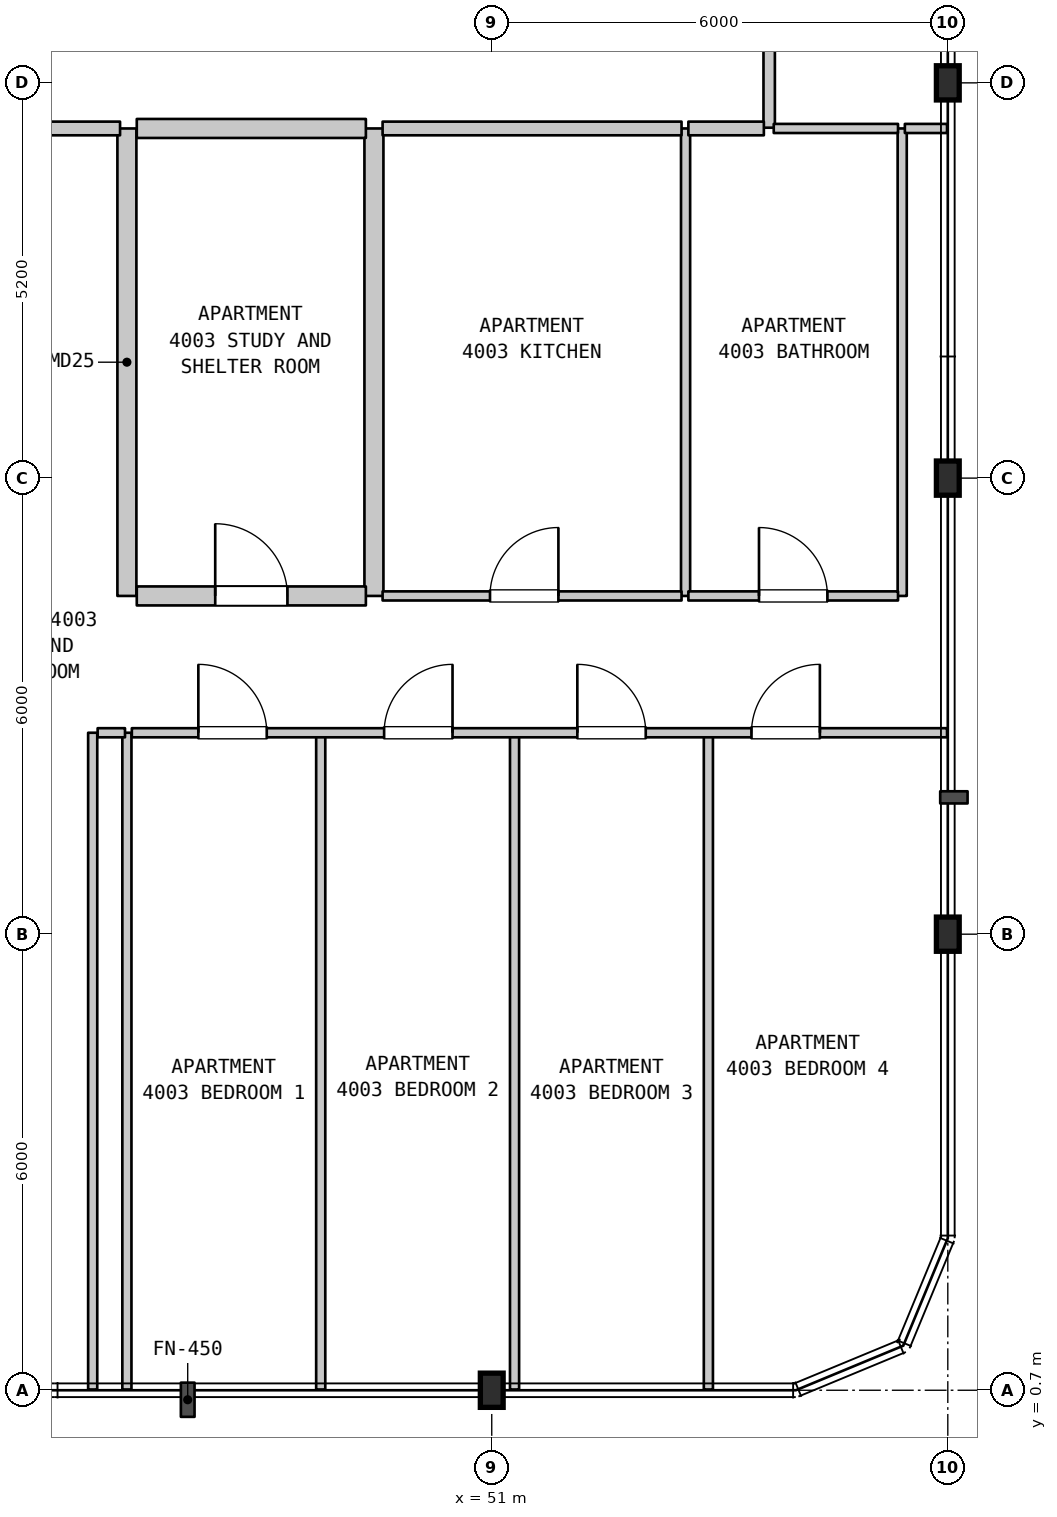
"""IFC4 building model, lengths in metres.
Left out: names, types, materials, properties, quantities, classifications, styles, units other than length and angle.
Written with IfcOpenShell. Run it as: python <this file> out.ifc"""

import sys

from ifc_helpers import new_model, si_unit, direction, frame, frame_2d, origin, origin_2d, place, context, subcontext, project, spatial, rectangle, i_section, extrude, element, fill, save


model = new_model("IFC4")
c1 = context("Model", 3, precision=1e-05, world=origin(), true_north=direction((0.0, 1.0)))
c2 = subcontext(c1, "Body", "Model", "MODEL_VIEW")
j1 = project(units=[si_unit("LENGTHUNIT", "METRE"), si_unit("PLANEANGLEUNIT", "RADIAN")], contexts=[c1])
p1 = place(None, origin())
s1 = spatial("IfcSite", under=j1, at=p1, CompositionType="ELEMENT")
p2 = place(p1, origin())
s2 = spatial("IfcBuilding", under=s1, at=p2, CompositionType="ELEMENT")
p3 = place(p2, frame((0.0, 0.0, 164.6)))
s3 = spatial("IfcBuildingStorey", under=s2, at=p3, CompositionType="ELEMENT", Elevation=164.6)
for number, where, z_axis, x_axis in (
    (1, (51.0, 0.7, 0.0), (0.0, 0.0, 1.0), (1.0, 0.0, 0.0)),
    (2, (57.0, 6.7, 0.0), (0.0, 0.0, 1.0), (1.0, 0.0, 0.0)),
    (3, (57.0, 12.7, 0.0), (0.0, 0.0, 1.0), (1.0, 0.0, 0.0)),
    (4, (57.0, 17.9, 0.0), (0.0, 0.0, 1.0), (1.0, 0.0, 0.0)),
):
    element("IfcColumn", number, at=place(p3, frame(where, z_axis=z_axis, x_axis=x_axis)), inside=s3, PredefinedType="COLUMN", context=c2, shape_type="SweptSolid", body=[
        extrude(i_section(OverallWidth=0.3, OverallDepth=0.45, WebThickness=0.014, FlangeThickness=0.026, FilletRadius=0.027, at=origin_2d()), origin(), (0.0, 0.0, 1.0), 4.5),
    ])
for number, where, z_axis, x_axis in (
    (5, (45.75, 0.71, 0.0), (0.0, 0.0, 1.0), (0.0, 1.0, 0.0)),
    (6, (46.2, 0.71, 0.0), (0.0, 0.0, 1.0), (0.0, 1.0, 0.0)),
):
    element("IfcWall", number, at=place(p3, frame(where, z_axis=z_axis, x_axis=x_axis)), inside=s3, PredefinedType="PARTITIONING", context=c2, shape_type="SweptSolid", body=[
        extrude(rectangle(XDim=8.64, YDim=0.12, at=frame_2d((4.32, 0.0))), origin(), (0.0, 0.0, 1.0), 4.19),
    ])
p4 = place(p3, frame((46.2, 11.15, 0.0), z_axis=(0.0, 0.0, 1.0), x_axis=(0.0, 1.0, 0.0)))
e7 = element("IfcWall", 7, at=p4, inside=s3, PredefinedType="STANDARD", context=c2, shape_type="SweptSolid", body=[
    extrude(rectangle(XDim=6.15, YDim=0.25, at=frame_2d((3.075, 0.0))), origin(), (0.0, 0.0, 1.0), 4.19),
])
p5 = place(p3, frame((48.75, 0.71, 0.0), z_axis=(0.0, 0.0, 1.0), x_axis=(0.0, 1.0, 0.0)))
e8 = element("IfcWall", 8, at=p5, inside=s3, PredefinedType="PARTITIONING", context=c2, shape_type="SweptSolid", body=[
    extrude(rectangle(XDim=8.64, YDim=0.12, at=frame_2d((4.32, 0.0))), origin(), (0.0, 0.0, 1.0), 4.19),
])
p6 = place(p3, frame((49.45, 11.15, 0.0), z_axis=(0.0, 0.0, 1.0), x_axis=(0.0, 1.0, 0.0)))
e9 = element("IfcWall", 9, at=p6, inside=s3, PredefinedType="STANDARD", context=c2, shape_type="SweptSolid", body=[
    extrude(rectangle(XDim=6.15, YDim=0.25, at=frame_2d((3.075, 0.0))), origin(), (0.0, 0.0, 1.0), 4.19),
])
p7 = place(p3, frame((51.3, 0.71, 0.0), z_axis=(0.0, 0.0, 1.0), x_axis=(0.0, 1.0, 0.0)))
e10 = element("IfcWall", 10, at=p7, inside=s3, PredefinedType="PARTITIONING", context=c2, shape_type="SweptSolid", body=[
    extrude(rectangle(XDim=8.64, YDim=0.12, at=frame_2d((4.32, 0.0))), origin(), (0.0, 0.0, 1.0), 4.19),
])
p8 = place(p3, frame((53.55, 11.15, 0.0), z_axis=(0.0, 0.0, 1.0), x_axis=(0.0, 1.0, 0.0)))
e11 = element("IfcWall", 11, at=p8, inside=s3, PredefinedType="PARTITIONING", context=c2, shape_type="SweptSolid", body=[
    extrude(rectangle(XDim=6.15, YDim=0.12, at=frame_2d((3.075, 0.0))), origin(), (0.0, 0.0, 1.0), 4.19),
])
p9 = place(p3, frame((53.85, 0.71, 0.0), z_axis=(0.0, 0.0, 1.0), x_axis=(0.0, 1.0, 0.0)))
e12 = element("IfcWall", 12, at=p9, inside=s3, PredefinedType="PARTITIONING", context=c2, shape_type="SweptSolid", body=[
    extrude(rectangle(XDim=8.64, YDim=0.12, at=frame_2d((4.32, 0.0))), origin(), (0.0, 0.0, 1.0), 4.19),
])
p10 = place(p3, frame((54.65, 17.31, 0.0), z_axis=(0.0, 0.0, 1.0), x_axis=(0.0, 1.0, 0.0)))
e13 = element("IfcWall", 13, at=p10, inside=s3, PredefinedType="STANDARD", context=c2, shape_type="SweptSolid", body=[
    extrude(rectangle(XDim=2.19, YDim=0.15, at=frame_2d((1.095, 0.0))), origin(), (0.0, 0.0, 1.0), 4.19),
])
p11 = place(p3, frame((56.4, 11.15, 0.0), z_axis=(0.0, 0.0, 1.0), x_axis=(0.0, 1.0, 0.0)))
e14 = element("IfcWall", 14, at=p11, inside=s3, PredefinedType="PARTITIONING", context=c2, shape_type="SweptSolid", body=[
    extrude(rectangle(XDim=6.15, YDim=0.12, at=frame_2d((3.075, 0.0))), origin(), (0.0, 0.0, 1.0), 4.19),
])
p12 = place(p3, frame((45.815, 9.35, 0.0), z_axis=(0.0, 0.0, 1.0), x_axis=(1.0, 0.0, 0.0)))
e15 = element("IfcWall", 15, at=p12, inside=s3, PredefinedType="PARTITIONING", context=c2, shape_type="SweptSolid", body=[
    extrude(rectangle(XDim=0.36, YDim=0.12, at=frame_2d((0.18, 0.0))), origin(), (0.0, 0.0, 1.0), 4.19),
])
p13 = place(p3, frame((46.265, 9.35, 0.0), z_axis=(0.0, 0.0, 1.0), x_axis=(1.0, 0.0, 0.0)))
e16 = element("IfcWall", 16, at=p13, inside=s3, PredefinedType="PARTITIONING", context=c2, shape_type="SweptSolid", body=[
    extrude(rectangle(XDim=10.725, YDim=0.12, at=frame_2d((5.363, 0.0))), origin(), (0.0, 0.0, 1.0), 4.19),
])
p14 = place(p13, frame((0.875, 0.0, 0.0)))
e17 = element("IfcOpeningElement", 17, at=p14, cuts=e16, PredefinedType="OPENING", context=c2, shape_type="SweptSolid", body=[
    extrude(rectangle(XDim=0.9, YDim=2.15, at=frame_2d((0.45, 1.075))), frame((0.0, 0.07, 0.0), z_axis=(0.0, -1.0, 0.0), x_axis=(1.0, 0.0, 0.0)), (0.0, 0.0, 1.0), 0.14),
])
p15 = place(p13, frame((3.319, 0.0, 0.0)))
e18 = element("IfcOpeningElement", 18, at=p15, cuts=e16, PredefinedType="OPENING", context=c2, shape_type="SweptSolid", body=[
    extrude(rectangle(XDim=0.9, YDim=2.15, at=frame_2d((0.45, 1.075))), frame((0.0, 0.07, 0.0), z_axis=(0.0, -1.0, 0.0), x_axis=(1.0, 0.0, 0.0)), (0.0, 0.0, 1.0), 0.14),
])
p16 = place(p13, frame((5.861, 0.0, 0.0)))
e19 = element("IfcOpeningElement", 19, at=p16, cuts=e16, PredefinedType="OPENING", context=c2, shape_type="SweptSolid", body=[
    extrude(rectangle(XDim=0.9, YDim=2.15, at=frame_2d((0.45, 1.075))), frame((0.0, 0.07, 0.0), z_axis=(0.0, -1.0, 0.0), x_axis=(1.0, 0.0, 0.0)), (0.0, 0.0, 1.0), 0.14),
])
p17 = place(p13, frame((8.152, 0.0, 0.0)))
e20 = element("IfcOpeningElement", 20, at=p17, cuts=e16, PredefinedType="OPENING", context=c2, shape_type="SweptSolid", body=[
    extrude(rectangle(XDim=0.9, YDim=2.15, at=frame_2d((0.45, 1.075))), frame((0.0, 0.07, 0.0), z_axis=(0.0, -1.0, 0.0), x_axis=(1.0, 0.0, 0.0)), (0.0, 0.0, 1.0), 0.14),
])
p18 = place(p3, frame((46.33, 11.15, 0.0), z_axis=(0.0, 0.0, 1.0), x_axis=(1.0, 0.0, 0.0)))
e21 = element("IfcWall", 21, at=p18, inside=s3, PredefinedType="STANDARD", context=c2, shape_type="SweptSolid", body=[
    extrude(rectangle(XDim=3.014, YDim=0.25, at=frame_2d((1.507, 0.0))), origin(), (0.0, 0.0, 1.0), 4.19),
])
p19 = place(p18, frame((1.032, 0.0, 0.0)))
e22 = element("IfcOpeningElement", 22, at=p19, cuts=e21, PredefinedType="OPENING", context=c2, shape_type="SweptSolid", body=[
    extrude(rectangle(XDim=0.95, YDim=2.15, at=frame_2d((0.475, 1.075))), frame((0.0, 0.135, 0.0), z_axis=(0.0, -1.0, 0.0), x_axis=(1.0, 0.0, 0.0)), (0.0, 0.0, 1.0), 0.27),
])
p20 = place(p3, frame((49.564, 11.15, 0.0), z_axis=(0.0, 0.0, 1.0), x_axis=(1.0, 0.0, 0.0)))
e23 = element("IfcWall", 23, at=p20, inside=s3, PredefinedType="PARTITIONING", context=c2, shape_type="SweptSolid", body=[
    extrude(rectangle(XDim=3.933, YDim=0.12, at=frame_2d((1.967, 0.0))), origin(), (0.0, 0.0, 1.0), 4.19),
])
p21 = place(p20, frame((1.413, 0.0, 0.0)))
e24 = element("IfcOpeningElement", 24, at=p21, cuts=e23, PredefinedType="OPENING", context=c2, shape_type="SweptSolid", body=[
    extrude(rectangle(XDim=0.9, YDim=2.15, at=frame_2d((0.45, 1.075))), frame((0.0, 0.07, 0.0), z_axis=(0.0, -1.0, 0.0), x_axis=(1.0, 0.0, 0.0)), (0.0, 0.0, 1.0), 0.14),
])
p22 = place(p3, frame((53.587, 11.15, 0.0), z_axis=(0.0, 0.0, 1.0), x_axis=(1.0, 0.0, 0.0)))
e25 = element("IfcWall", 25, at=p22, inside=s3, PredefinedType="PARTITIONING", context=c2, shape_type="SweptSolid", body=[
    extrude(rectangle(XDim=2.758, YDim=0.12, at=frame_2d((1.379, 0.0))), origin(), (0.0, 0.0, 1.0), 4.19),
])
p23 = place(p22, frame((0.929, 0.0, 0.0)))
e26 = element("IfcOpeningElement", 26, at=p23, cuts=e25, PredefinedType="OPENING", context=c2, shape_type="SweptSolid", body=[
    extrude(rectangle(XDim=0.9, YDim=2.1, at=frame_2d((0.45, 1.05))), frame((0.0, 0.07, 0.0), z_axis=(0.0, -1.0, 0.0), x_axis=(1.0, 0.0, 0.0)), (0.0, 0.0, 1.0), 0.14),
])
p24 = place(p3, frame((40.565, 17.3, 0.0), z_axis=(0.0, 0.0, 1.0), x_axis=(1.0, 0.0, 0.0)))
e27 = element("IfcWall", 27, at=p24, inside=s3, PredefinedType="STANDARD", context=c2, shape_type="SweptSolid", body=[
    extrude(rectangle(XDim=5.545, YDim=0.18, at=frame_2d((2.772, 0.0))), origin(), (0.0, 0.0, 1.0), 4.19),
])
p25 = place(p24, frame((2.305, 0.0, 0.0)))
e28 = element("IfcOpeningElement", 28, at=p25, cuts=e27, PredefinedType="OPENING", context=c2, shape_type="SweptSolid", body=[
    extrude(rectangle(XDim=1.0, YDim=2.15, at=frame_2d((0.5, 1.075))), frame((0.0, 0.1, 0.0), z_axis=(0.0, -1.0, 0.0), x_axis=(1.0, 0.0, 0.0)), (0.0, 0.0, 1.0), 0.2),
])
p26 = place(p3, frame((46.33, 17.3, 0.0), z_axis=(0.0, 0.0, 1.0), x_axis=(1.0, 0.0, 0.0)))
e29 = element("IfcWall", 29, at=p26, inside=s3, PredefinedType="STANDARD", context=c2, shape_type="SweptSolid", body=[
    extrude(rectangle(XDim=3.014, YDim=0.25, at=frame_2d((1.507, 0.0))), origin(), (0.0, 0.0, 1.0), 4.19),
])
p27 = place(p3, frame((49.564, 17.3, 0.0), z_axis=(0.0, 0.0, 1.0), x_axis=(1.0, 0.0, 0.0)))
e30 = element("IfcWall", 30, at=p27, inside=s3, PredefinedType="STANDARD", context=c2, shape_type="SweptSolid", body=[
    extrude(rectangle(XDim=3.933, YDim=0.18, at=frame_2d((1.967, 0.0))), origin(), (0.0, 0.0, 1.0), 4.19),
])
p28 = place(p3, frame((53.587, 17.3, 0.0), z_axis=(0.0, 0.0, 1.0), x_axis=(1.0, 0.0, 0.0)))
e31 = element("IfcWall", 31, at=p28, inside=s3, PredefinedType="STANDARD", context=c2, shape_type="SweptSolid", body=[
    extrude(rectangle(XDim=0.993, YDim=0.18, at=frame_2d((0.497, 0.0))), origin(), (0.0, 0.0, 1.0), 4.19),
])
p29 = place(p3, frame((54.71, 17.3, 0.0), z_axis=(0.0, 0.0, 1.0), x_axis=(1.0, 0.0, 0.0)))
e32 = element("IfcWall", 32, at=p29, inside=s3, PredefinedType="PARTITIONING", context=c2, shape_type="SweptSolid", body=[
    extrude(rectangle(XDim=1.635, YDim=0.12, at=frame_2d((0.817, 0.0))), origin(), (0.0, 0.0, 1.0), 4.19),
])
p30 = place(p3, frame((56.435, 17.3, 0.0), z_axis=(0.0, 0.0, 1.0), x_axis=(1.0, 0.0, 0.0)))
e33 = element("IfcWall", 33, at=p30, inside=s3, PredefinedType="PARTITIONING", context=c2, shape_type="SweptSolid", body=[
    extrude(rectangle(XDim=0.555, YDim=0.12, at=frame_2d((0.277, 0.0))), origin(), (0.0, 0.0, 1.0), 4.19),
])
p31 = place(p14, origin())
e34 = element("IfcDoor", 34, at=p31, inside=s3, OperationType="SINGLE_SWING_LEFT", PredefinedType="DOOR", context=c2, shape_type="SweptSolid", body=[
    extrude(rectangle(XDim=0.9, YDim=2.15, at=frame_2d((0.45, 1.075))), frame((0.0, 0.025, 0.0), z_axis=(0.0, -1.0, 0.0), x_axis=(1.0, 0.0, 0.0)), (0.0, 0.0, 1.0), 0.05),
])
fill(e17, e34)
p32 = place(p15, origin())
e35 = element("IfcDoor", 35, at=p32, inside=s3, OperationType="SINGLE_SWING_RIGHT", PredefinedType="DOOR", context=c2, shape_type="SweptSolid", body=[
    extrude(rectangle(XDim=0.9, YDim=2.15, at=frame_2d((0.45, 1.075))), frame((0.0, 0.025, 0.0), z_axis=(0.0, -1.0, 0.0), x_axis=(1.0, 0.0, 0.0)), (0.0, 0.0, 1.0), 0.05),
])
fill(e18, e35)
p33 = place(p16, origin())
e36 = element("IfcDoor", 36, at=p33, inside=s3, OperationType="SINGLE_SWING_LEFT", PredefinedType="DOOR", context=c2, shape_type="SweptSolid", body=[
    extrude(rectangle(XDim=0.9, YDim=2.15, at=frame_2d((0.45, 1.075))), frame((0.0, 0.025, 0.0), z_axis=(0.0, -1.0, 0.0), x_axis=(1.0, 0.0, 0.0)), (0.0, 0.0, 1.0), 0.05),
])
fill(e19, e36)
p34 = place(p17, origin())
e37 = element("IfcDoor", 37, at=p34, inside=s3, OperationType="SINGLE_SWING_RIGHT", PredefinedType="DOOR", context=c2, shape_type="SweptSolid", body=[
    extrude(rectangle(XDim=0.9, YDim=2.15, at=frame_2d((0.45, 1.075))), frame((0.0, 0.025, 0.0), z_axis=(0.0, -1.0, 0.0), x_axis=(1.0, 0.0, 0.0)), (0.0, 0.0, 1.0), 0.05),
])
fill(e20, e37)
p35 = place(p19, origin())
e38 = element("IfcDoor", 38, at=p35, inside=s3, OperationType="SINGLE_SWING_LEFT", PredefinedType="DOOR", context=c2, shape_type="SweptSolid", body=[
    extrude(rectangle(XDim=0.95, YDim=2.15, at=frame_2d((0.475, 1.075))), frame((0.0, 0.025, 0.0), z_axis=(0.0, -1.0, 0.0), x_axis=(1.0, 0.0, 0.0)), (0.0, 0.0, 1.0), 0.05),
])
fill(e22, e38)
p36 = place(p21, origin())
e39 = element("IfcDoor", 39, at=p36, inside=s3, OperationType="SINGLE_SWING_RIGHT", PredefinedType="DOOR", context=c2, shape_type="SweptSolid", body=[
    extrude(rectangle(XDim=0.9, YDim=2.15, at=frame_2d((0.45, 1.075))), frame((0.0, 0.025, 0.0), z_axis=(0.0, -1.0, 0.0), x_axis=(1.0, 0.0, 0.0)), (0.0, 0.0, 1.0), 0.05),
])
fill(e24, e39)
p37 = place(p23, origin())
e40 = element("IfcDoor", 40, at=p37, inside=s3, OperationType="SINGLE_SWING_LEFT", PredefinedType="DOOR", context=c2, shape_type="SweptSolid", body=[
    extrude(rectangle(XDim=0.9, YDim=2.1, at=frame_2d((0.45, 1.05))), frame((0.0, 0.025, 0.0), z_axis=(0.0, -1.0, 0.0), x_axis=(1.0, 0.0, 0.0)), (0.0, 0.0, 1.0), 0.05),
])
fill(e26, e40)
save(model, sys.argv[1])
